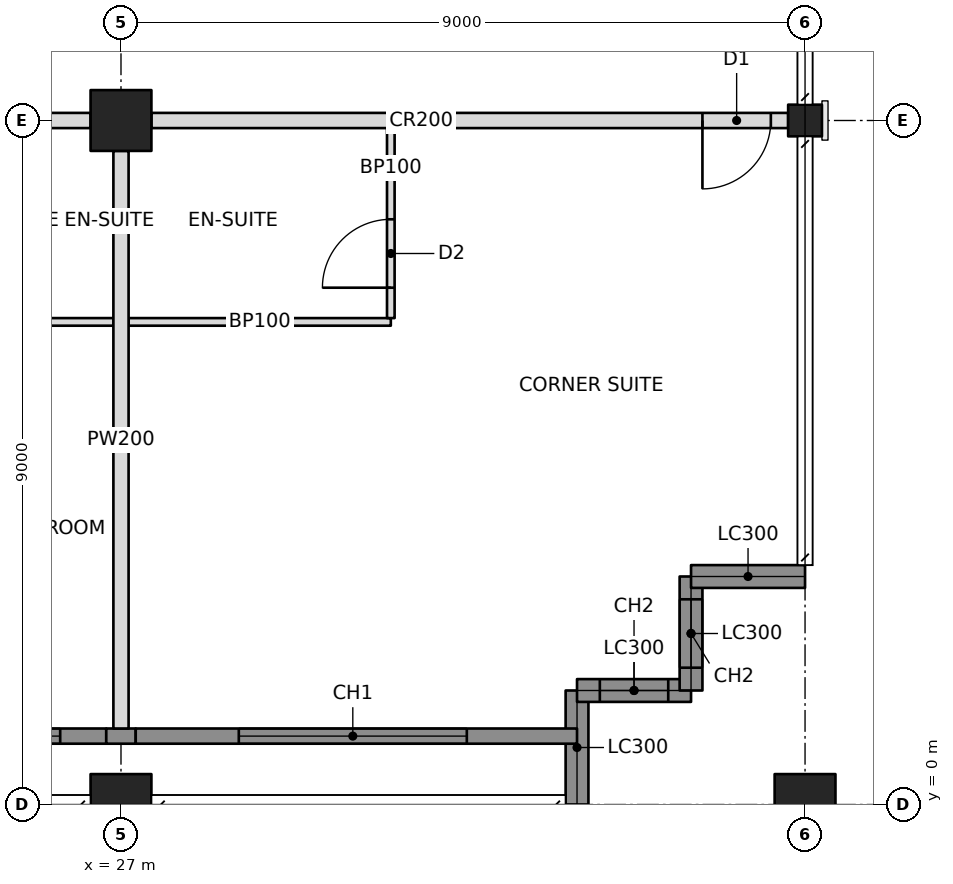
"""IFC4 building model, lengths in metres.
Left out: names, types, materials, properties, quantities, classifications, styles, units other than length and angle.
Written with IfcOpenShell. Run it as: python <this file> out.ifc"""

import sys

from ifc_helpers import new_model, si_unit, direction, frame, frame_2d, origin, origin_2d, place, context, subcontext, project, spatial, rectangle, hollow_rectangle, i_section, extrude, element, fill, save


model = new_model("IFC4")
c1 = context("Model", 3, precision=1e-05, world=origin(), true_north=direction((0.0, 1.0)))
c2 = subcontext(c1, "Body", "Model", "MODEL_VIEW")
j1 = project(units=[si_unit("LENGTHUNIT", "METRE"), si_unit("PLANEANGLEUNIT", "RADIAN")], contexts=[c1])
p1 = place(None, origin())
s1 = spatial("IfcSite", under=j1, at=p1, CompositionType="ELEMENT")
p2 = place(p1, origin())
s2 = spatial("IfcBuilding", under=s1, at=p2, CompositionType="ELEMENT")
p3 = place(p2, frame((0.0, 0.0, 251.8)))
s3 = spatial("IfcBuildingStorey", under=s2, at=p3, CompositionType="ELEMENT", Elevation=251.8)
for number, where, z_axis, x_axis in (
    (1, (27.0, 0.0, 0.0), (0.0, 0.0, 1.0), (1.0, 0.0, 0.0)),
    (2, (27.0, 9.0, 0.0), (0.0, 0.0, 1.0), (1.0, 0.0, 0.0)),
    (3, (36.0, 0.0, 0.0), (0.0, 0.0, 1.0), (1.0, 0.0, 0.0)),
):
    element("IfcColumn", number, at=place(p3, frame(where, z_axis=z_axis, x_axis=x_axis)), inside=s3, PredefinedType="COLUMN", context=c2, shape_type="SweptSolid", body=[
        extrude(hollow_rectangle(XDim=0.8, YDim=0.8, WallThickness=0.032, at=origin_2d()), origin(), (0.0, 0.0, 1.0), 3.6),
    ])
p4 = place(p3, frame((36.0, 9.0, 0.0), z_axis=(0.0, 0.0, 1.0), x_axis=(0.0, 1.0, 0.0)))
e4 = element("IfcColumn", 4, at=p4, inside=s3, PredefinedType="COLUMN", context=c2, shape_type="SweptSolid", body=[
    extrude(i_section(OverallWidth=0.417, OverallDepth=0.445, WebThickness=0.039, FlangeThickness=0.063, at=origin_2d()), origin(), (0.0, 0.0, 1.0), 3.6),
])
p5 = place(p3, frame((33.0, 0.0, 0.0), z_axis=(0.0, 0.0, 1.0), x_axis=(0.0, 1.0, 0.0)))
e5 = element("IfcWall", 5, at=p5, inside=s3, PredefinedType="SOLIDWALL", context=c2, shape_type="SweptSolid", body=[
    extrude(rectangle(XDim=1.5, YDim=0.3, at=frame_2d((0.75, 0.0))), origin(), (0.0, 0.0, 1.0), 2.62),
])
p6 = place(p3, frame((33.0, 1.5, 0.0), z_axis=(0.0, 0.0, 1.0), x_axis=(1.0, 0.0, 0.0)))
e6 = element("IfcWall", 6, at=p6, inside=s3, PredefinedType="SOLIDWALL", context=c2, shape_type="SweptSolid", body=[
    extrude(rectangle(XDim=1.5, YDim=0.3, at=frame_2d((0.75, 0.0))), origin(), (0.0, 0.0, 1.0), 3.4),
])
p7 = place(p6, frame((0.3, 0.0, 0.6)))
e7 = element("IfcOpeningElement", 7, at=p7, cuts=e6, PredefinedType="OPENING", context=c2, shape_type="SweptSolid", body=[
    extrude(rectangle(XDim=0.9, YDim=2.2, at=frame_2d((0.45, 1.1))), frame((0.0, 0.16, 0.0), z_axis=(0.0, -1.0, 0.0), x_axis=(1.0, 0.0, 0.0)), (0.0, 0.0, 1.0), 0.32),
])
p8 = place(p3, frame((34.5, 1.5, 0.0), z_axis=(0.0, 0.0, 1.0), x_axis=(0.0, 1.0, 0.0)))
e8 = element("IfcWall", 8, at=p8, inside=s3, PredefinedType="SOLIDWALL", context=c2, shape_type="SweptSolid", body=[
    extrude(rectangle(XDim=1.5, YDim=0.3, at=frame_2d((0.75, 0.0))), origin(), (0.0, 0.0, 1.0), 3.4),
])
p9 = place(p8, frame((0.3, 0.0, 0.6)))
e9 = element("IfcOpeningElement", 9, at=p9, cuts=e8, PredefinedType="OPENING", context=c2, shape_type="SweptSolid", body=[
    extrude(rectangle(XDim=0.9, YDim=2.2, at=frame_2d((0.45, 1.1))), frame((0.0, 0.16, 0.0), z_axis=(0.0, -1.0, 0.0), x_axis=(1.0, 0.0, 0.0)), (0.0, 0.0, 1.0), 0.32),
])
p10 = place(p3, frame((34.5, 3.0, 0.0), z_axis=(0.0, 0.0, 1.0), x_axis=(1.0, 0.0, 0.0)))
e10 = element("IfcWall", 10, at=p10, inside=s3, PredefinedType="SOLIDWALL", context=c2, shape_type="SweptSolid", body=[
    extrude(rectangle(XDim=1.5, YDim=0.3, at=frame_2d((0.75, 0.0))), origin(), (0.0, 0.0, 1.0), 2.62),
])
p11 = place(p3, frame((18.4, 9.0, 0.0), z_axis=(0.0, 0.0, 1.0), x_axis=(1.0, 0.0, 0.0)))
e11 = element("IfcWall", 11, at=p11, inside=s3, PredefinedType="PARTITIONING", context=c2, shape_type="SweptSolid", body=[
    extrude(rectangle(XDim=8.2, YDim=0.2, at=frame_2d((4.1, 0.0))), origin(), (0.0, 0.0, 1.0), 2.605),
])
p12 = place(p11, frame((2.95, 0.0, 0.0)))
e12 = element("IfcOpeningElement", 12, at=p12, cuts=e11, PredefinedType="OPENING", context=c2, shape_type="SweptSolid", body=[
    extrude(rectangle(XDim=0.9, YDim=2.1, at=frame_2d((0.45, 1.05))), frame((0.0, 0.11, 0.0), z_axis=(0.0, -1.0, 0.0), x_axis=(1.0, 0.0, 0.0)), (0.0, 0.0, 1.0), 0.22),
])
p13 = place(p11, frame((4.35, 0.0, 0.0)))
e13 = element("IfcOpeningElement", 13, at=p13, cuts=e11, PredefinedType="OPENING", context=c2, shape_type="SweptSolid", body=[
    extrude(rectangle(XDim=0.9, YDim=2.1, at=frame_2d((0.45, 1.05))), frame((0.0, 0.11, 0.0), z_axis=(0.0, -1.0, 0.0), x_axis=(1.0, 0.0, 0.0)), (0.0, 0.0, 1.0), 0.22),
])
p14 = place(p3, frame((27.4, 9.0, 0.0), z_axis=(0.0, 0.0, 1.0), x_axis=(1.0, 0.0, 0.0)))
e14 = element("IfcWall", 14, at=p14, inside=s3, PredefinedType="PARTITIONING", context=c2, shape_type="SweptSolid", body=[
    extrude(rectangle(XDim=8.378, YDim=0.2, at=frame_2d((4.189, 0.0))), origin(), (0.0, 0.0, 1.0), 2.605),
])
p15 = place(p14, frame((7.25, 0.0, 0.0)))
e15 = element("IfcOpeningElement", 15, at=p15, cuts=e14, PredefinedType="OPENING", context=c2, shape_type="SweptSolid", body=[
    extrude(rectangle(XDim=0.9, YDim=2.1, at=frame_2d((0.45, 1.05))), frame((0.0, 0.11, 0.0), z_axis=(0.0, -1.0, 0.0), x_axis=(1.0, 0.0, 0.0)), (0.0, 0.0, 1.0), 0.22),
])
p16 = place(p3, frame((27.0, 8.6, 0.0), z_axis=(0.0, 0.0, 1.0), x_axis=(0.0, -1.0, 0.0)))
e16 = element("IfcWall", 16, at=p16, inside=s3, PredefinedType="PARTITIONING", context=c2, shape_type="SweptSolid", body=[
    extrude(rectangle(XDim=7.6, YDim=0.2, at=frame_2d((3.8, 0.0))), origin(), (0.0, 0.0, 1.0), 2.605),
])
p17 = place(p3, frame((23.95, 6.35, 0.0), z_axis=(0.0, 0.0, 1.0), x_axis=(1.0, 0.0, 0.0)))
e17 = element("IfcWall", 17, at=p17, inside=s3, PredefinedType="PARTITIONING", context=c2, shape_type="SweptSolid", body=[
    extrude(rectangle(XDim=2.95, YDim=0.1, at=frame_2d((1.475, 0.0))), origin(), (0.0, 0.0, 1.0), 2.604),
])
p18 = place(p3, frame((27.1, 6.35, 0.0), z_axis=(0.0, 0.0, 1.0), x_axis=(1.0, 0.0, 0.0)))
e18 = element("IfcWall", 18, at=p18, inside=s3, PredefinedType="PARTITIONING", context=c2, shape_type="SweptSolid", body=[
    extrude(rectangle(XDim=3.45, YDim=0.1, at=frame_2d((1.725, 0.0))), origin(), (0.0, 0.0, 1.0), 2.604),
])
p19 = place(p3, frame((30.55, 8.9, 0.0), z_axis=(0.0, 0.0, 1.0), x_axis=(0.0, -1.0, 0.0)))
e19 = element("IfcWall", 19, at=p19, inside=s3, PredefinedType="PARTITIONING", context=c2, shape_type="SweptSolid", body=[
    extrude(rectangle(XDim=2.5, YDim=0.1, at=frame_2d((1.25, 0.0))), origin(), (0.0, 0.0, 1.0), 2.604),
])
p20 = place(p19, frame((1.2, 0.0, 0.0)))
e20 = element("IfcOpeningElement", 20, at=p20, cuts=e19, PredefinedType="OPENING", context=c2, shape_type="SweptSolid", body=[
    extrude(rectangle(XDim=0.9, YDim=2.1, at=frame_2d((0.45, 1.05))), frame((0.0, 0.06, 0.0), z_axis=(0.0, -1.0, 0.0), x_axis=(1.0, 0.0, 0.0)), (0.0, 0.0, 1.0), 0.12),
])
p21 = place(p3, frame((18.194, 0.9, 0.0), z_axis=(0.0, 0.0, 1.0), x_axis=(1.0, 0.0, 0.0)))
e21 = element("IfcWall", 21, at=p21, inside=s3, PredefinedType="SOLIDWALL", context=c2, shape_type="SweptSolid", body=[
    extrude(rectangle(XDim=8.612, YDim=0.2, at=frame_2d((4.306, 0.0))), origin(), (0.0, 0.0, 1.0), 3.4),
])
p22 = place(p21, frame((0.606, 0.0, 0.6)))
e22 = element("IfcOpeningElement", 22, at=p22, cuts=e21, PredefinedType="OPENING", context=c2, shape_type="SweptSolid", body=[
    extrude(rectangle(XDim=3.0, YDim=2.2, at=frame_2d((1.5, 1.1))), frame((0.0, 0.11, 0.0), z_axis=(0.0, -1.0, 0.0), x_axis=(1.0, 0.0, 0.0)), (0.0, 0.0, 1.0), 0.22),
])
p23 = place(p21, frame((5.006, 0.0, 0.6)))
e23 = element("IfcOpeningElement", 23, at=p23, cuts=e21, PredefinedType="OPENING", context=c2, shape_type="SweptSolid", body=[
    extrude(rectangle(XDim=3.0, YDim=2.2, at=frame_2d((1.5, 1.1))), frame((0.0, 0.11, 0.0), z_axis=(0.0, -1.0, 0.0), x_axis=(1.0, 0.0, 0.0)), (0.0, 0.0, 1.0), 0.22),
])
p24 = place(p3, frame((26.806, 0.9, 0.0), z_axis=(0.0, 0.0, 1.0), x_axis=(1.0, 0.0, 0.0)))
e24 = element("IfcWall", 24, at=p24, inside=s3, PredefinedType="SOLIDWALL", context=c2, shape_type="SweptSolid", body=[
    extrude(rectangle(XDim=0.388, YDim=0.2, at=frame_2d((0.194, 0.0))), origin(), (0.0, 0.0, 1.0), 2.604),
])
p25 = place(p3, frame((27.194, 0.9, 0.0), z_axis=(0.0, 0.0, 1.0), x_axis=(1.0, 0.0, 0.0)))
e25 = element("IfcWall", 25, at=p25, inside=s3, PredefinedType="SOLIDWALL", context=c2, shape_type="SweptSolid", body=[
    extrude(rectangle(XDim=5.806, YDim=0.2, at=frame_2d((2.903, 0.0))), origin(), (0.0, 0.0, 1.0), 3.4),
])
p26 = place(p25, frame((1.356, 0.0, 0.6)))
e26 = element("IfcOpeningElement", 26, at=p26, cuts=e25, PredefinedType="OPENING", context=c2, shape_type="SweptSolid", body=[
    extrude(rectangle(XDim=3.0, YDim=2.2, at=frame_2d((1.5, 1.1))), frame((0.0, 0.11, 0.0), z_axis=(0.0, -1.0, 0.0), x_axis=(1.0, 0.0, 0.0)), (0.0, 0.0, 1.0), 0.22),
])
p27 = place(p7, origin())
e27 = element("IfcWindow", 27, at=p27, inside=s3, PartitioningType="SINGLE_PANEL", PredefinedType="WINDOW", context=c2, shape_type="SweptSolid", body=[
    extrude(rectangle(XDim=0.9, YDim=2.2, at=frame_2d((0.45, 1.1))), frame((0.0, 0.03, 0.0), z_axis=(0.0, -1.0, 0.0), x_axis=(1.0, 0.0, 0.0)), (0.0, 0.0, 1.0), 0.06),
])
fill(e7, e27)
p28 = place(p9, origin())
e28 = element("IfcWindow", 28, at=p28, inside=s3, PartitioningType="SINGLE_PANEL", PredefinedType="WINDOW", context=c2, shape_type="SweptSolid", body=[
    extrude(rectangle(XDim=0.9, YDim=2.2, at=frame_2d((0.45, 1.1))), frame((0.0, 0.03, 0.0), z_axis=(0.0, -1.0, 0.0), x_axis=(1.0, 0.0, 0.0)), (0.0, 0.0, 1.0), 0.06),
])
fill(e9, e28)
p29 = place(p23, origin())
e29 = element("IfcWindow", 29, at=p29, inside=s3, PartitioningType="TRIPLE_PANEL_VERTICAL", PredefinedType="WINDOW", context=c2, shape_type="SweptSolid", body=[
    extrude(rectangle(XDim=3.0, YDim=2.2, at=frame_2d((1.5, 1.1))), frame((0.0, 0.03, 0.0), z_axis=(0.0, -1.0, 0.0), x_axis=(1.0, 0.0, 0.0)), (0.0, 0.0, 1.0), 0.06),
])
fill(e23, e29)
p30 = place(p26, origin())
e30 = element("IfcWindow", 30, at=p30, inside=s3, PartitioningType="TRIPLE_PANEL_VERTICAL", PredefinedType="WINDOW", context=c2, shape_type="SweptSolid", body=[
    extrude(rectangle(XDim=3.0, YDim=2.2, at=frame_2d((1.5, 1.1))), frame((0.0, 0.03, 0.0), z_axis=(0.0, -1.0, 0.0), x_axis=(1.0, 0.0, 0.0)), (0.0, 0.0, 1.0), 0.06),
])
fill(e26, e30)
p31 = place(p20, frame((0.9, 0.0, 0.0), z_axis=(0.0, 0.0, 1.0), x_axis=(-1.0, 0.0, 0.0)))
e31 = element("IfcDoor", 31, at=p31, inside=s3, OperationType="SINGLE_SWING_LEFT", PredefinedType="DOOR", context=c2, shape_type="SweptSolid", body=[
    extrude(rectangle(XDim=0.9, YDim=2.1, at=frame_2d((0.45, 1.05))), frame((0.0, 0.025, 0.0), z_axis=(0.0, -1.0, 0.0), x_axis=(1.0, 0.0, 0.0)), (0.0, 0.0, 1.0), 0.05),
])
fill(e20, e31)
p32 = place(p15, frame((0.9, 0.0, 0.0), z_axis=(0.0, 0.0, 1.0), x_axis=(-1.0, 0.0, 0.0)))
e32 = element("IfcDoor", 32, at=p32, inside=s3, OperationType="SINGLE_SWING_RIGHT", PredefinedType="DOOR", context=c2, shape_type="SweptSolid", body=[
    extrude(rectangle(XDim=0.9, YDim=2.1, at=frame_2d((0.45, 1.05))), frame((0.0, 0.025, 0.0), z_axis=(0.0, -1.0, 0.0), x_axis=(1.0, 0.0, 0.0)), (0.0, 0.0, 1.0), 0.05),
])
fill(e15, e32)
save(model, sys.argv[1])
